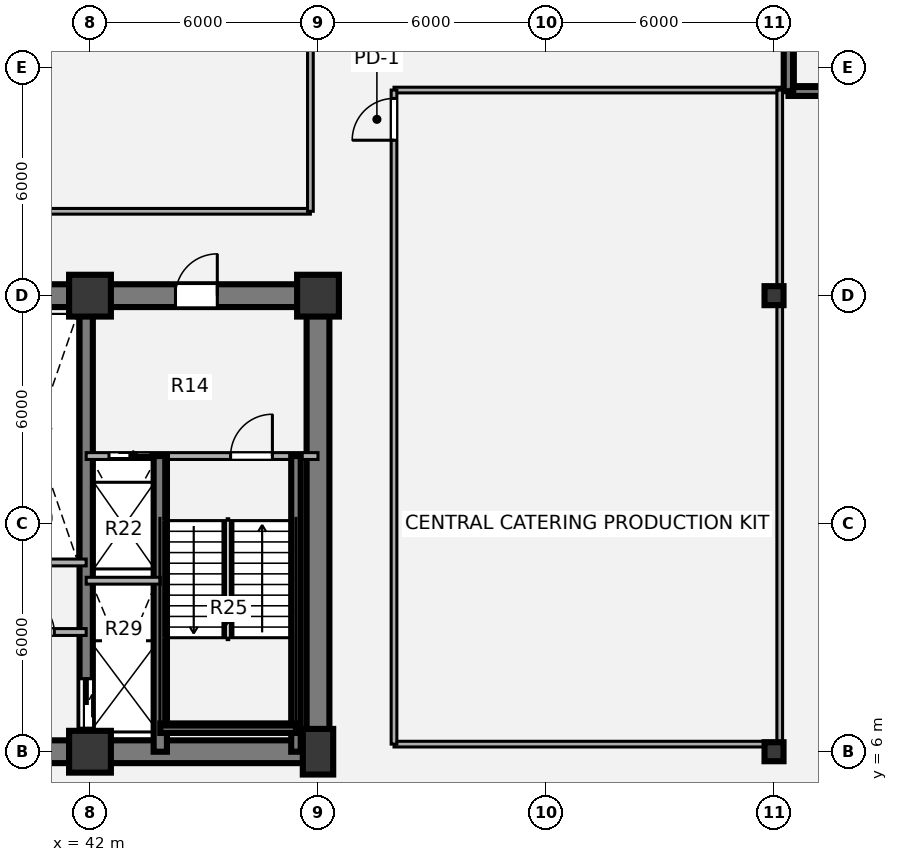
"""IFC4 building model, lengths in metres.
Left out: names, types, materials, properties, quantities, classifications, styles, units other than length and angle.
Written with IfcOpenShell. Run it as: python <this file> out.ifc"""

import sys

from ifc_helpers import new_model, si_unit, direction, frame, frame_2d, origin, origin_2d, place, context, subcontext, project, spatial, rectangle, i_section, extrude, source, transform, mapped, element, fill, save


model = new_model("IFC4")
c1 = context("Model", 3, precision=1e-05, world=origin(), true_north=direction((0.0, 1.0)))
c2 = subcontext(c1, "Body", "Model", "MODEL_VIEW")
j1 = project(units=[si_unit("LENGTHUNIT", "METRE"), si_unit("PLANEANGLEUNIT", "RADIAN")], contexts=[c1])
p1 = place(None, origin())
s1 = spatial("IfcSite", under=j1, at=p1, CompositionType="ELEMENT")
p2 = place(p1, origin())
s2 = spatial("IfcBuilding", under=s1, at=p2, CompositionType="ELEMENT")
p3 = place(p2, frame((0.0, 0.0, 18.36)))
s3 = spatial("IfcBuildingStorey", under=s2, at=p3, CompositionType="ELEMENT", Elevation=18.36)
m1 = source(origin(), c2, "Body", "SweptSolid", [
    extrude(rectangle(XDim=1.1, YDim=1.1, at=origin_2d()), origin(), (0.0, 0.0, 1.0), 4.32),
])
p4 = place(p3, frame((42.0, 6.0, 0.0), z_axis=(0.0, 0.0, 1.0), x_axis=(1.0, 0.0, 0.0)))
e1 = element("IfcColumn", 1, at=p4, inside=s3, PredefinedType="COLUMN", context=c2, shape_type="MappedRepresentation", body=[
    mapped(m1, transform((0.0, 0.0, 0.0), x_axis=(1.0, 0.0, 0.0), y_axis=(0.0, 1.0, 0.0), z_axis=(0.0, 0.0, 1.0), scale=1.0)),
])
m2 = source(origin(), c2, "Body", "SweptSolid", [
    extrude(rectangle(XDim=0.8, YDim=1.2, at=origin_2d()), origin(), (0.0, 0.0, 1.0), 4.32),
])
p5 = place(p3, frame((48.0, 6.0, 0.0), z_axis=(0.0, 0.0, 1.0), x_axis=(1.0, 0.0, 0.0)))
e2 = element("IfcColumn", 2, at=p5, inside=s3, PredefinedType="COLUMN", context=c2, shape_type="MappedRepresentation", body=[
    mapped(m2, transform((0.0, 0.0, 0.0), x_axis=(1.0, 0.0, 0.0), y_axis=(0.0, 1.0, 0.0), z_axis=(0.0, 0.0, 1.0), scale=1.0)),
])
for number, where, z_axis, x_axis in (
    (3, (42.0, 18.0, 0.0), (0.0, 0.0, 1.0), (1.0, 0.0, 0.0)),
    (4, (48.0, 18.0, 0.0), (0.0, 0.0, 1.0), (1.0, 0.0, 0.0)),
):
    element("IfcColumn", number, at=place(p3, frame(where, z_axis=z_axis, x_axis=x_axis)), inside=s3, PredefinedType="COLUMN", context=c2, shape_type="MappedRepresentation", body=[
        mapped(m1, transform((0.0, 0.0, 0.0), x_axis=(1.0, 0.0, 0.0), y_axis=(0.0, 1.0, 0.0), z_axis=(0.0, 0.0, 1.0), scale=1.0)),
    ])
p6 = place(p3, frame((48.3, 6.0, 0.0), z_axis=(0.0, 0.0, 1.0), x_axis=(-1.0, 0.0, 0.0)))
e5 = element("IfcWall", 5, at=p6, inside=s3, PredefinedType="SHEAR", context=c2, shape_type="SweptSolid", body=[
    extrude(rectangle(XDim=24.6, YDim=0.6, at=frame_2d((12.3, 0.0))), origin(), (0.0, 0.0, 1.0), 4.32),
])
p7 = place(p3, frame((48.0, 18.0, 0.0), z_axis=(0.0, 0.0, 1.0), x_axis=(0.0, -1.0, 0.0)))
e6 = element("IfcWall", 6, at=p7, inside=s3, PredefinedType="SHEAR", context=c2, shape_type="SweptSolid", body=[
    extrude(rectangle(XDim=12.0, YDim=0.6, at=frame_2d((6.0, 0.0))), origin(), (0.0, 0.0, 1.0), 4.32),
])
p8 = place(p3, frame((38.8, 18.0, 0.0), z_axis=(0.0, 0.0, 1.0), x_axis=(1.0, 0.0, 0.0)))
e7 = element("IfcWall", 7, at=p8, inside=s3, PredefinedType="SHEAR", context=c2, shape_type="SweptSolid", body=[
    extrude(rectangle(XDim=9.5, YDim=0.6, at=frame_2d((4.75, 0.0))), origin(), (0.0, 0.0, 1.0), 4.32),
])
p9 = place(p8, frame((5.45, 0.0, 0.0)))
e8 = element("IfcOpeningElement", 8, at=p9, cuts=e7, PredefinedType="OPENING", context=c2, shape_type="SweptSolid", body=[
    extrude(rectangle(XDim=1.1, YDim=2.1, at=origin_2d()), frame((0.55, 0.31, 1.05), z_axis=(0.0, -1.0, 0.0), x_axis=(1.0, 0.0, 0.0)), (0.0, 0.0, 1.0), 0.62),
])
p10 = place(p3, frame((41.9, 18.0, 0.0), z_axis=(0.0, 0.0, 1.0), x_axis=(0.0, -1.0, 0.0)))
e9 = element("IfcWall", 9, at=p10, inside=s3, PredefinedType="SHEAR", context=c2, shape_type="SweptSolid", body=[
    extrude(rectangle(XDim=12.0, YDim=0.35, at=frame_2d((6.0, 0.0))), origin(), (0.0, 0.0, 1.0), 4.32),
])
p11 = place(p10, frame((10.08, 0.0, 0.0)))
e10 = element("IfcOpeningElement", 10, at=p11, cuts=e9, PredefinedType="OPENING", context=c2, shape_type="SweptSolid", body=[
    extrude(rectangle(XDim=1.3, YDim=2.1, at=origin_2d()), frame((0.65, 0.185, 1.05), z_axis=(0.0, -1.0, 0.0), x_axis=(1.0, 0.0, 0.0)), (0.0, 0.0, 1.0), 0.37),
])
m3 = source(origin(), c2, "Body", "SweptSolid", [
    extrude(i_section(OverallWidth=0.5, OverallDepth=0.5, WebThickness=0.022, FlangeThickness=0.035, at=origin_2d()), origin(), (0.0, 0.0, 1.0), 4.32),
])
for number, where, z_axis, x_axis in (
    (11, (60.0, 6.0, 0.0), (0.0, 0.0, 1.0), (1.0, 0.0, 0.0)),
    (12, (60.0, 18.0, 0.0), (0.0, 0.0, 1.0), (1.0, 0.0, 0.0)),
):
    element("IfcColumn", number, at=place(p3, frame(where, z_axis=z_axis, x_axis=x_axis)), inside=s3, PredefinedType="COLUMN", context=c2, shape_type="MappedRepresentation", body=[
        mapped(m3, transform((0.0, 0.0, 0.0), x_axis=(1.0, 0.0, 0.0), y_axis=(0.0, 1.0, 0.0), z_axis=(0.0, 0.0, 1.0), scale=1.0)),
    ])
p12 = place(p3, frame((60.38, 23.38, 0.0), z_axis=(0.0, 0.0, 1.0), x_axis=(1.0, 0.0, 0.0)))
e13 = element("IfcWall", 13, at=p12, inside=s3, PredefinedType="SHEAR", context=c2, shape_type="SweptSolid", body=[
    extrude(rectangle(XDim=3.74, YDim=0.25, at=frame_2d((1.87, 0.0))), origin(), (0.0, 0.0, 1.0), 4.32),
])
p13 = place(p3, frame((60.38, 23.38, 0.0), z_axis=(0.0, 0.0, 1.0), x_axis=(0.0, 1.0, 0.0)))
e14 = element("IfcWall", 14, at=p13, inside=s3, PredefinedType="SHEAR", context=c2, shape_type="SweptSolid", body=[
    extrude(rectangle(XDim=7.47, YDim=0.25, at=frame_2d((3.735, 0.0))), origin(), (0.0, 0.0, 1.0), 4.32),
])
p14 = place(p3, frame((39.35, 10.98, 0.0), z_axis=(0.0, 0.0, 1.0), x_axis=(1.0, 0.0, 0.0)))
e15 = element("IfcWall", 15, at=p14, inside=s3, PredefinedType="PARTITIONING", context=c2, shape_type="SweptSolid", body=[
    extrude(rectangle(XDim=2.55, YDim=0.18, at=frame_2d((1.275, 0.0))), origin(), (0.0, 0.0, 1.0), 4.01),
])
p15 = place(p3, frame((39.35, 9.15, 0.0), z_axis=(0.0, 0.0, 1.0), x_axis=(1.0, 0.0, 0.0)))
e16 = element("IfcWall", 16, at=p15, inside=s3, PredefinedType="PARTITIONING", context=c2, shape_type="SweptSolid", body=[
    extrude(rectangle(XDim=2.55, YDim=0.18, at=frame_2d((1.275, 0.0))), origin(), (0.0, 0.0, 1.0), 4.01),
])
p16 = place(p15, frame((0.85, 0.0, 0.0)))
e17 = element("IfcOpeningElement", 17, at=p16, cuts=e16, PredefinedType="OPENING", context=c2, shape_type="SweptSolid", body=[
    extrude(rectangle(XDim=0.86, YDim=2.1, at=origin_2d()), frame((0.43, 0.1, 1.05), z_axis=(0.0, -1.0, 0.0), x_axis=(1.0, 0.0, 0.0)), (0.0, 0.0, 1.0), 0.2),
])
p17 = place(p3, frame((41.9, 13.78, 0.0), z_axis=(0.0, 0.0, 1.0), x_axis=(1.0, 0.0, 0.0)))
e18 = element("IfcWall", 18, at=p17, inside=s3, PredefinedType="PARTITIONING", context=c2, shape_type="SweptSolid", body=[
    extrude(rectangle(XDim=6.1, YDim=0.18, at=frame_2d((3.05, 0.0))), origin(), (0.0, 0.0, 1.0), 4.01),
])
p18 = place(p17, frame((0.6, 0.0, 0.0)))
e19 = element("IfcOpeningElement", 19, at=p18, cuts=e18, PredefinedType="OPENING", context=c2, shape_type="SweptSolid", body=[
    extrude(rectangle(XDim=1.1, YDim=2.1, at=origin_2d()), frame((0.55, 0.1, 1.05), z_axis=(0.0, -1.0, 0.0), x_axis=(1.0, 0.0, 0.0)), (0.0, 0.0, 1.0), 0.2),
])
p19 = place(p17, frame((3.8, 0.0, 0.0)))
e20 = element("IfcOpeningElement", 20, at=p19, cuts=e18, PredefinedType="OPENING", context=c2, shape_type="SweptSolid", body=[
    extrude(rectangle(XDim=1.1, YDim=2.1, at=origin_2d()), frame((0.55, 0.1, 1.05), z_axis=(0.0, -1.0, 0.0), x_axis=(1.0, 0.0, 0.0)), (0.0, 0.0, 1.0), 0.2),
])
p20 = place(p3, frame((43.85, 6.0, 0.0), z_axis=(0.0, 0.0, 1.0), x_axis=(0.0, 1.0, 0.0)))
e21 = element("IfcWall", 21, at=p20, inside=s3, PredefinedType="SHEAR", context=c2, shape_type="SweptSolid", body=[
    extrude(rectangle(XDim=7.78, YDim=0.35, at=frame_2d((3.89, 0.0))), origin(), (0.0, 0.0, 1.0), 4.36),
])
p21 = place(p3, frame((47.42, 6.0, 0.0), z_axis=(0.0, 0.0, 1.0), x_axis=(0.0, 1.0, 0.0)))
e22 = element("IfcWall", 22, at=p21, inside=s3, PredefinedType="SHEAR", context=c2, shape_type="SweptSolid", body=[
    extrude(rectangle(XDim=7.78, YDim=0.25, at=frame_2d((3.89, 0.0))), origin(), (0.0, 0.0, 1.0), 4.36),
])
p22 = place(p3, frame((43.85, 6.62, 0.0), z_axis=(0.0, 0.0, 1.0), x_axis=(1.0, 0.0, 0.0)))
e23 = element("IfcWall", 23, at=p22, inside=s3, PredefinedType="SHEAR", context=c2, shape_type="SweptSolid", body=[
    extrude(rectangle(XDim=3.57, YDim=0.25, at=frame_2d((1.785, 0.0))), origin(), (0.0, 0.0, 1.0), 4.36),
])
p23 = place(p3, frame((41.9, 10.5, 0.0), z_axis=(0.0, 0.0, 1.0), x_axis=(1.0, 0.0, 0.0)))
e24 = element("IfcWall", 24, at=p23, inside=s3, PredefinedType="PARTITIONING", context=c2, shape_type="SweptSolid", body=[
    extrude(rectangle(XDim=1.95, YDim=0.18, at=frame_2d((0.975, 0.0))), origin(), (0.0, 0.0, 1.0), 4.01),
])
p24 = place(p3, frame((50.0, 6.2, 0.0), z_axis=(0.0, 0.0, 1.0), x_axis=(1.0, 0.0, 0.0)))
e25 = element("IfcWall", 25, at=p24, inside=s3, PredefinedType="PARTITIONING", context=c2, shape_type="SweptSolid", body=[
    extrude(rectangle(XDim=10.15, YDim=0.15, at=frame_2d((5.075, 0.0))), origin(), (0.0, 0.0, 1.0), 2.225),
])
p25 = place(p3, frame((24.2, 20.22, 0.0), z_axis=(0.0, 0.0, 1.0), x_axis=(1.0, 0.0, 0.0)))
e26 = element("IfcWall", 26, at=p25, inside=s3, PredefinedType="PARTITIONING", context=c2, shape_type="SweptSolid", body=[
    extrude(rectangle(XDim=23.6, YDim=0.15, at=frame_2d((11.8, 0.0))), origin(), (0.0, 0.0, 1.0), 2.225),
])
p26 = place(p3, frame((50.0, 23.41, 0.0), z_axis=(0.0, 0.0, 1.0), x_axis=(1.0, 0.0, 0.0)))
e27 = element("IfcWall", 27, at=p26, inside=s3, PredefinedType="PARTITIONING", context=c2, shape_type="SweptSolid", body=[
    extrude(rectangle(XDim=10.15, YDim=0.15, at=frame_2d((5.075, 0.0))), origin(), (0.0, 0.0, 1.0), 4.01),
])
p27 = place(p3, frame((47.8, 20.22, 0.0), z_axis=(0.0, 0.0, 1.0), x_axis=(0.0, 1.0, 0.0)))
e28 = element("IfcWall", 28, at=p27, inside=s3, PredefinedType="PARTITIONING", context=c2, shape_type="SweptSolid", body=[
    extrude(rectangle(XDim=10.63, YDim=0.15, at=frame_2d((5.315, 0.0))), origin(), (0.0, 0.0, 1.0), 2.225),
])
p28 = place(p3, frame((50.0, 6.2, 0.0), z_axis=(0.0, 0.0, 1.0), x_axis=(0.0, 1.0, 0.0)))
e29 = element("IfcWall", 29, at=p28, inside=s3, PredefinedType="PARTITIONING", context=c2, shape_type="SweptSolid", body=[
    extrude(rectangle(XDim=17.21, YDim=0.15, at=frame_2d((8.605, 0.0))), origin(), (0.0, 0.0, 1.0), 3.718),
])
p29 = place(p28, frame((15.89, 0.0, 0.0)))
e30 = element("IfcOpeningElement", 30, at=p29, cuts=e29, PredefinedType="OPENING", context=c2, shape_type="SweptSolid", body=[
    extrude(rectangle(XDim=1.1, YDim=2.1, at=origin_2d()), frame((0.55, 0.085, 1.05), z_axis=(0.0, -1.0, 0.0), x_axis=(1.0, 0.0, 0.0)), (0.0, 0.0, 1.0), 0.17),
])
p30 = place(p3, frame((60.15, 6.2, 0.0), z_axis=(0.0, 0.0, 1.0), x_axis=(0.0, 1.0, 0.0)))
e31 = element("IfcWall", 31, at=p30, inside=s3, PredefinedType="PARTITIONING", context=c2, shape_type="SweptSolid", body=[
    extrude(rectangle(XDim=17.21, YDim=0.15, at=frame_2d((8.605, 0.0))), origin(), (0.0, 0.0, 1.0), 2.225),
])
m4 = source(origin(), c2, "Body", "SweptSolid", [
    extrude(rectangle(XDim=0.86, YDim=2.1, at=origin_2d()), frame((0.43, 0.025, 1.05), z_axis=(0.0, -1.0, 0.0), x_axis=(1.0, 0.0, 0.0)), (0.0, 0.0, 1.0), 0.05),
])
p31 = place(p16, origin())
e32 = element("IfcDoor", 32, at=p31, inside=s3, OperationType="SINGLE_SWING_LEFT", PredefinedType="DOOR", context=c2, shape_type="MappedRepresentation", body=[
    mapped(m4, transform((0.0, 0.0, 0.0), x_axis=(1.0, 0.0, 0.0), y_axis=(0.0, 1.0, 0.0), z_axis=(0.0, 0.0, 1.0), scale=1.0)),
])
fill(e17, e32)
m5 = source(origin(), c2, "Body", "SweptSolid", [
    extrude(rectangle(XDim=1.1, YDim=2.1, at=origin_2d()), frame((0.55, 0.025, 1.05), z_axis=(0.0, -1.0, 0.0), x_axis=(1.0, 0.0, 0.0)), (0.0, 0.0, 1.0), 0.05),
])
p32 = place(p18, origin())
e33 = element("IfcDoor", 33, at=p32, inside=s3, OperationType="SLIDING_TO_RIGHT", PredefinedType="DOOR", context=c2, shape_type="MappedRepresentation", body=[
    mapped(m5, transform((0.0, 0.0, 0.0), x_axis=(1.0, 0.0, 0.0), y_axis=(0.0, 1.0, 0.0), z_axis=(0.0, 0.0, 1.0), scale=1.0)),
])
fill(e19, e33)
m6 = source(origin(), c2, "Body", "SweptSolid", [
    extrude(rectangle(XDim=1.1, YDim=2.1, at=origin_2d()), frame((0.55, 0.025, 1.05), z_axis=(0.0, -1.0, 0.0), x_axis=(1.0, 0.0, 0.0)), (0.0, 0.0, 1.0), 0.05),
])
p33 = place(p19, origin())
e34 = element("IfcDoor", 34, at=p33, inside=s3, OperationType="SINGLE_SWING_RIGHT", PredefinedType="DOOR", context=c2, shape_type="MappedRepresentation", body=[
    mapped(m6, transform((0.0, 0.0, 0.0), x_axis=(1.0, 0.0, 0.0), y_axis=(0.0, 1.0, 0.0), z_axis=(0.0, 0.0, 1.0), scale=1.0)),
])
fill(e20, e34)
m7 = source(origin(), c2, "Body", "SweptSolid", [
    extrude(rectangle(XDim=1.3, YDim=2.1, at=origin_2d()), frame((0.65, 0.025, 1.05), z_axis=(0.0, -1.0, 0.0), x_axis=(1.0, 0.0, 0.0)), (0.0, 0.0, 1.0), 0.05),
])
p34 = place(p11, origin())
e35 = element("IfcDoor", 35, at=p34, inside=s3, OperationType="SLIDING_TO_LEFT", PredefinedType="DOOR", context=c2, shape_type="MappedRepresentation", body=[
    mapped(m7, transform((0.0, 0.0, 0.0), x_axis=(1.0, 0.0, 0.0), y_axis=(0.0, 1.0, 0.0), z_axis=(0.0, 0.0, 1.0), scale=1.0)),
])
fill(e10, e35)
m8 = source(origin(), c2, "Body", "SweptSolid", [
    extrude(rectangle(XDim=1.1, YDim=2.1, at=origin_2d()), frame((0.55, 0.025, 1.05), z_axis=(0.0, -1.0, 0.0), x_axis=(1.0, 0.0, 0.0)), (0.0, 0.0, 1.0), 0.05),
])
p35 = place(p9, origin())
e36 = element("IfcDoor", 36, at=p35, inside=s3, OperationType="SINGLE_SWING_RIGHT", PredefinedType="DOOR", context=c2, shape_type="MappedRepresentation", body=[
    mapped(m8, transform((0.0, 0.0, 0.0), x_axis=(1.0, 0.0, 0.0), y_axis=(0.0, 1.0, 0.0), z_axis=(0.0, 0.0, 1.0), scale=1.0)),
])
fill(e8, e36)
m9 = source(origin(), c2, "Body", "SweptSolid", [
    extrude(rectangle(XDim=1.1, YDim=2.1, at=origin_2d()), frame((0.55, 0.025, 1.05), z_axis=(0.0, -1.0, 0.0), x_axis=(1.0, 0.0, 0.0)), (0.0, 0.0, 1.0), 0.05),
])
p36 = place(p29, origin())
e37 = element("IfcDoor", 37, at=p36, inside=s3, OperationType="SINGLE_SWING_LEFT", PredefinedType="DOOR", context=c2, shape_type="MappedRepresentation", body=[
    mapped(m9, transform((0.0, 0.0, 0.0), x_axis=(1.0, 0.0, 0.0), y_axis=(0.0, 1.0, 0.0), z_axis=(0.0, 0.0, 1.0), scale=1.0)),
])
fill(e30, e37)
save(model, sys.argv[1])
